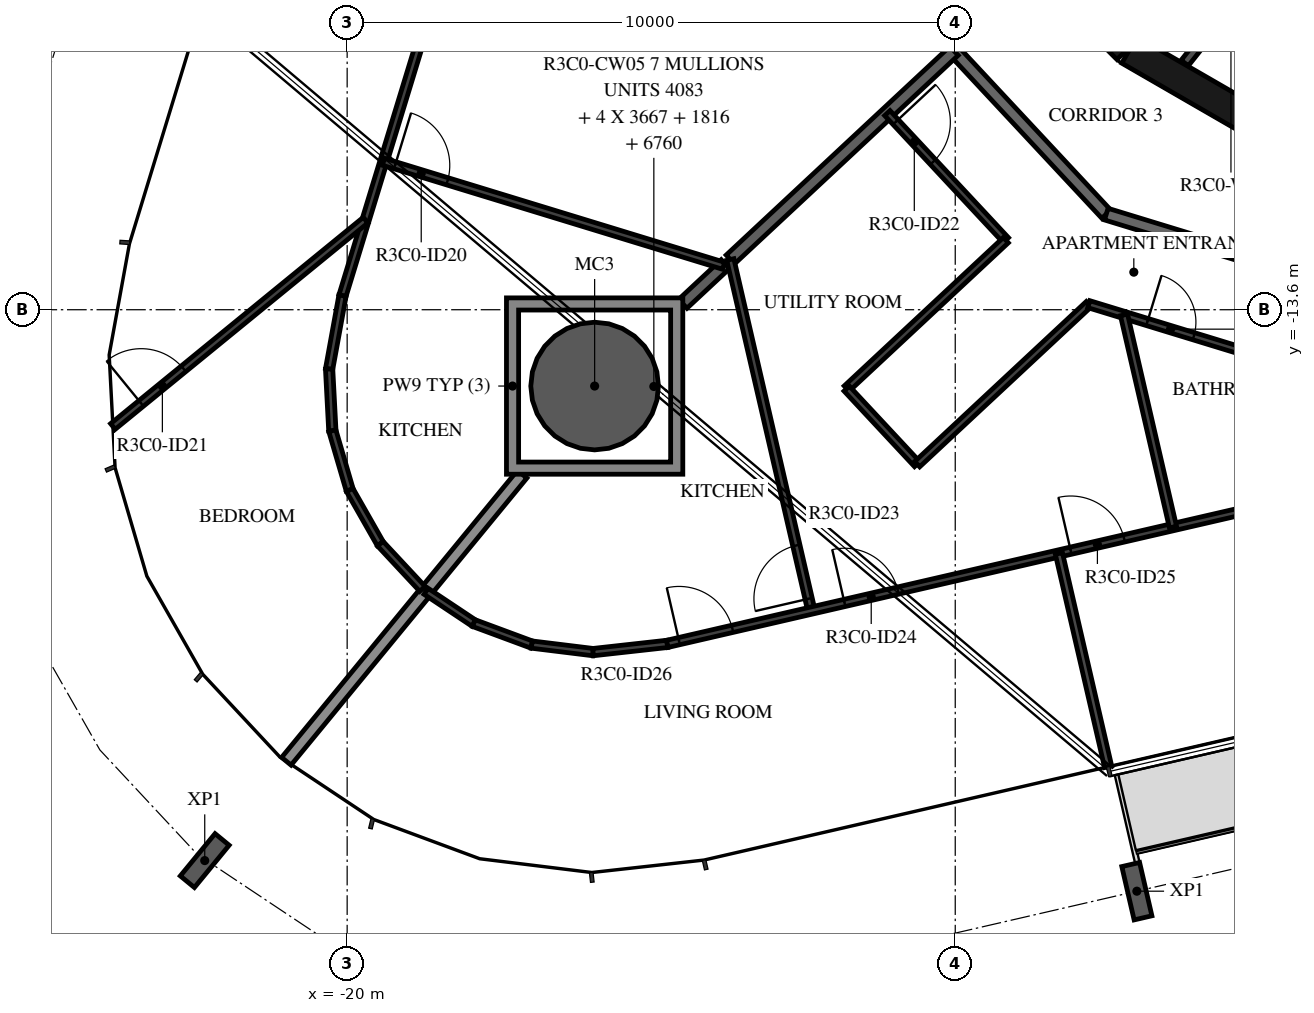
"""IFC4 building model, lengths in metres.
Left out: names, types, materials, properties, quantities, classifications, styles, units other than length and angle.
Written with IfcOpenShell. Run it as: python <this file> out.ifc"""

import sys

from ifc_helpers import new_model, si_unit, direction, frame, frame_2d, origin, origin_2d, place, context, subcontext, project, spatial, polyline, rectangle, hollow_circle, i_section, outline, extrude, element, fill, save


model = new_model("IFC4")
c1 = context("Model", 3, precision=1e-05, world=origin(), true_north=direction((0.0, 1.0)))
c2 = subcontext(c1, "Body", "Model", "MODEL_VIEW")
j1 = project(units=[si_unit("LENGTHUNIT", "METRE"), si_unit("PLANEANGLEUNIT", "RADIAN")], contexts=[c1])
p1 = place(None, origin())
s1 = spatial("IfcSite", under=j1, at=p1, CompositionType="ELEMENT")
p2 = place(p1, origin())
s2 = spatial("IfcBuilding", under=s1, at=p2, CompositionType="ELEMENT")
p3 = place(p2, frame((0.0, 0.0, 134.4)))
s3 = spatial("IfcBuildingStorey", under=s2, at=p3, CompositionType="ELEMENT", Elevation=134.4)
p4 = place(p3, frame((-15.93, -14.855, -0.38), z_axis=(0.0, 0.0, 1.0), x_axis=(1.0, 0.0, 0.0)))
e1 = element("IfcColumn", 1, at=p4, inside=s3, PredefinedType="COLUMN", context=c2, shape_type="SweptSolid", body=[
    extrude(hollow_circle(Radius=1.05, WallThickness=0.05, at=origin_2d()), origin(), (0.0, 0.0, 1.0), 3.5),
])
for number, where, z_axis, x_axis in (
    (2, (-22.342, -22.659, -0.38), (0.0, 0.0, 1.0), (-0.773, 0.635, 0.0)),
    (3, (-7.013, -23.162, -0.38), (0.0, 0.0, 1.0), (-0.974, -0.225, 0.0)),
):
    element("IfcColumn", number, at=place(p3, frame(where, z_axis=z_axis, x_axis=x_axis)), inside=s3, PredefinedType="COLUMN", context=c2, shape_type="SweptSolid", body=[
        extrude(i_section(OverallWidth=0.3, OverallDepth=0.9, WebThickness=0.019, FlangeThickness=0.035, FilletRadius=0.03, at=origin_2d()), origin(), (0.0, 0.0, 1.0), 3.5),
    ])
p5 = place(p3, frame((-9.308, -7.164, 0.0), z_axis=(0.0, 0.0, 1.0), x_axis=(0.707106781187, -0.707106781187, 0.0)))
e4 = element("IfcWall", 4, at=p5, inside=s3, PredefinedType="SHEAR", context=c2, shape_type="SweptSolid", body=[
    extrude(rectangle(XDim=3.032, YDim=0.5, at=frame_2d((1.516, 0.0))), origin(), (0.0, 0.0, 1.0), 3.12),
])
p6 = place(p3, frame((-7.137, -9.329, 0.0), z_axis=(0.0, 0.0, 1.0), x_axis=(0.865975092491, -0.500087131594, 0.0)))
e5 = element("IfcWall", 5, at=p6, inside=s3, PredefinedType="SHEAR", context=c2, shape_type="SweptSolid", body=[
    extrude(rectangle(XDim=3.033, YDim=0.5, at=frame_2d((1.516, 0.0))), origin(), (0.0, 0.0, 1.0), 3.12),
])
p7 = place(p3, frame((-4.706, -7.625, 0.0), z_axis=(0.0, 0.0, 1.0), x_axis=(-0.621392599334, -0.783499353856, 0.0)))
e6 = element("IfcWall", 6, at=p7, inside=s3, PredefinedType="PARTITIONING", context=c2, shape_type="SweptSolid", body=[
    extrude(rectangle(XDim=2.447, YDim=0.15, at=frame_2d((1.224, 0.0))), origin(), (0.0, 0.0, 1.0), 3.12),
])
p8 = place(p7, frame((0.774, 0.0, 0.0)))
e7 = element("IfcOpeningElement", 7, at=p8, cuts=e6, PredefinedType="OPENING", context=c2, shape_type="SweptSolid", body=[
    extrude(rectangle(XDim=0.9, YDim=2.1, at=frame_2d((0.45, 1.05))), frame((0.0, 0.085, 0.0), z_axis=(0.0, -1.0, 0.0), x_axis=(1.0, 0.0, 0.0)), (0.0, 0.0, 1.0), 0.17),
])
p9 = place(p3, frame((-12.523, -6.659, 0.0), z_axis=(0.0, 0.0, 1.0), x_axis=(0.682001841105, -0.731350455479, 0.0)))
e8 = element("IfcWall", 8, at=p9, inside=s3, PredefinedType="STANDARD", context=c2, shape_type="SweptSolid", body=[
    extrude(rectangle(XDim=7.342, YDim=0.2, at=frame_2d((3.671, 0.0))), origin(), (0.0, 0.0, 1.0), 3.12),
])
p10 = place(p3, frame((-7.516, -12.028, 0.0), z_axis=(0.0, 0.0, 1.0), x_axis=(0.956306642771, -0.292365533182, 0.0)))
e9 = element("IfcWall", 9, at=p10, inside=s3, PredefinedType="STANDARD", context=c2, shape_type="SweptSolid", body=[
    extrude(rectangle(XDim=7.342, YDim=0.2, at=frame_2d((3.671, 0.0))), origin(), (0.0, 0.0, 1.0), 3.12),
])
p11 = place(p10, frame((5.745, 0.0, 0.0)))
e10 = element("IfcOpeningElement", 10, at=p11, cuts=e9, PredefinedType="OPENING", context=c2, shape_type="SweptSolid", body=[
    extrude(rectangle(XDim=1.0, YDim=2.1, at=frame_2d((0.5, 1.05))), frame((0.0, 0.11, 0.0), z_axis=(0.0, -1.0, 0.0), x_axis=(1.0, 0.0, 0.0)), (0.0, 0.0, 1.0), 0.22),
])
p12 = place(p3, frame((-13.699, -12.774, 0.0), z_axis=(0.0, 0.0, 1.0), x_axis=(0.731353758457, 0.681998299111, 0.0)))
e11 = element("IfcWall", 11, at=p12, inside=s3, PredefinedType="STANDARD", context=c2, shape_type="SweptSolid", body=[
    extrude(rectangle(XDim=5.031, YDim=0.2, at=frame_2d((2.515, 0.0))), origin(), (0.0, 0.0, 1.0), 3.12),
])
p13 = place(p3, frame((-21.0, -21.025, 0.0), z_axis=(0.0, 0.0, 1.0), x_axis=(0.634846795952, 0.772638043116, 0.0)))
e12 = element("IfcWall", 12, at=p13, inside=s3, PredefinedType="STANDARD", context=c2, shape_type="SweptSolid", body=[
    extrude(rectangle(XDim=6.109, YDim=0.2, at=frame_2d((3.055, 0.0))), origin(), (0.0, 0.0, 1.0), 2.73),
])
p14 = place(p3, frame((-14.48, -13.503, 0.0), z_axis=(0.0, 0.0, 1.0), x_axis=(0.73152991834, 0.681809341806, 0.0)))
e13 = element("IfcWall", 13, at=p14, inside=s3, PredefinedType="STANDARD", context=c2, shape_type="SweptSolid", body=[
    extrude(rectangle(XDim=0.958, YDim=0.2, at=frame_2d((0.479, 0.0))), origin(), (0.0, 0.0, 1.0), 3.12),
])
p15 = place(p3, frame((-16.579, -1.928, 0.0), z_axis=(0.0, 0.0, 1.0), x_axis=(-0.29236733738, -0.956306091183, 0.0)))
e14 = element("IfcWall", 14, at=p15, inside=s3, PredefinedType="PARTITIONING", context=c2, shape_type="SweptSolid", body=[
    extrude(rectangle(XDim=11.963, YDim=0.12, at=frame_2d((5.981, 0.0))), origin(), (0.0, 0.0, 1.0), 3.12),
])
p16 = place(p15, frame((3.271, 0.0, 0.0)))
e15 = element("IfcOpeningElement", 15, at=p16, cuts=e14, PredefinedType="OPENING", context=c2, shape_type="SweptSolid", body=[
    extrude(rectangle(XDim=0.9, YDim=2.1, at=frame_2d((0.45, 1.05))), frame((0.0, 0.07, 0.0), z_axis=(0.0, -1.0, 0.0), x_axis=(1.0, 0.0, 0.0)), (0.0, 0.0, 1.0), 0.14),
])
p17 = place(p3, frame((-19.404, -11.167, 0.0), z_axis=(0.0, 0.0, 1.0), x_axis=(0.956314306829, -0.292340463423, 0.0)))
e16 = element("IfcWall", 16, at=p17, inside=s3, PredefinedType="PARTITIONING", context=c2, shape_type="SweptSolid", body=[
    extrude(rectangle(XDim=5.85, YDim=0.12, at=frame_2d((2.925, 0.0))), origin(), (0.0, 0.0, 1.0), 3.12),
])
p18 = place(p17, frame((0.2, 0.0, 0.0)))
e17 = element("IfcOpeningElement", 17, at=p18, cuts=e16, PredefinedType="OPENING", context=c2, shape_type="SweptSolid", body=[
    extrude(rectangle(XDim=0.9, YDim=2.1, at=frame_2d((0.45, 1.05))), frame((0.0, 0.07, 0.0), z_axis=(0.0, -1.0, 0.0), x_axis=(1.0, 0.0, 0.0)), (0.0, 0.0, 1.0), 0.14),
])
p19 = place(p3, frame((-23.852, -15.52, 0.0), z_axis=(0.0, 0.0, 1.0), x_axis=(0.774546990858, 0.632516370502, 0.0)))
e18 = element("IfcWall", 18, at=p19, inside=s3, PredefinedType="PARTITIONING", context=c2, shape_type="SweptSolid", body=[
    extrude(rectangle(XDim=5.365, YDim=0.12, at=frame_2d((2.682, 0.0))), origin(), (0.0, 0.0, 1.0), 3.12),
])
p20 = place(p19, frame((0.6, 0.0, 0.0)))
e19 = element("IfcOpeningElement", 19, at=p20, cuts=e18, PredefinedType="OPENING", context=c2, shape_type="SweptSolid", body=[
    extrude(rectangle(XDim=0.9, YDim=2.1, at=frame_2d((0.45, 1.05))), frame((0.0, 0.07, 0.0), z_axis=(0.0, -1.0, 0.0), x_axis=(1.0, 0.0, 0.0)), (0.0, 0.0, 1.0), 0.14),
])
p21 = place(p3, frame((-20.077, -13.368, 0.0), z_axis=(0.0, 0.0, 1.0), x_axis=(-0.179288174895, -0.983796600087, 0.0)))
e20 = element("IfcWall", 20, at=p21, inside=s3, PredefinedType="PARTITIONING", context=c2, shape_type="SweptSolid", body=[
    extrude(rectangle(XDim=1.227, YDim=0.12, at=frame_2d((0.613, 0.0))), origin(), (0.0, 0.0, 1.0), 3.12),
])
p22 = place(p3, frame((-20.297, -14.575, 0.0), z_axis=(0.0, 0.0, 1.0), x_axis=(0.052142637988, -0.998639647372, 0.0)))
e21 = element("IfcWall", 21, at=p22, inside=s3, PredefinedType="PARTITIONING", context=c2, shape_type="SweptSolid", body=[
    extrude(rectangle(XDim=1.016, YDim=0.12, at=frame_2d((0.508, 0.0))), origin(), (0.0, 0.0, 1.0), 3.12),
])
for number, where, z_axis, x_axis in (
    (22, (-20.244, -15.59, 0.0), (0.0, 0.0, 1.0), (0.281, -0.96, 0.0)),
    (23, (-19.958, -16.565, 0.0), (0.0, 0.0, 1.0), (0.495, -0.869, 0.0)),
    (24, (-19.455, -17.448, 0.0), (0.0, 0.0, 1.0), (0.682, -0.731, 0.0)),
):
    element("IfcWall", number, at=place(p3, frame(where, z_axis=z_axis, x_axis=x_axis)), inside=s3, PredefinedType="PARTITIONING", context=c2, shape_type="SweptSolid", body=[
        extrude(rectangle(XDim=1.016, YDim=0.12, at=frame_2d((0.508, 0.0))), origin(), (0.0, 0.0, 1.0), 3.12),
    ])
p23 = place(p3, frame((-11.117, -10.366, 0.0), z_axis=(0.0, 0.0, 1.0), x_axis=(0.682029016154, -0.73132511315, 0.0)))
e25 = element("IfcWall", 25, at=p23, inside=s3, PredefinedType="PARTITIONING", context=c2, shape_type="SweptSolid", body=[
    extrude(rectangle(XDim=2.858, YDim=0.12, at=frame_2d((1.429, 0.0))), origin(), (0.0, 0.0, 1.0), 3.12),
])
p24 = place(p23, frame((0.2, 0.0, 0.0)))
e26 = element("IfcOpeningElement", 26, at=p24, cuts=e25, PredefinedType="OPENING", context=c2, shape_type="SweptSolid", body=[
    extrude(rectangle(XDim=0.9, YDim=2.1, at=frame_2d((0.45, 1.05))), frame((0.0, 0.07, 0.0), z_axis=(0.0, -1.0, 0.0), x_axis=(1.0, 0.0, 0.0)), (0.0, 0.0, 1.0), 0.14),
])
p25 = place(p3, frame((-9.168, -12.456, 0.0), z_axis=(0.0, 0.0, 1.0), x_axis=(-0.731372816465, -0.681977861324, 0.0)))
e27 = element("IfcWall", 27, at=p25, inside=s3, PredefinedType="PARTITIONING", context=c2, shape_type="SweptSolid", body=[
    extrude(rectangle(XDim=3.578, YDim=0.12, at=frame_2d((1.789, 0.0))), origin(), (0.0, 0.0, 1.0), 3.12),
])
p26 = place(p3, frame((-11.785, -14.897, 0.0), z_axis=(0.0, 0.0, 1.0), x_axis=(0.681975367709, -0.73137514166, 0.0)))
e28 = element("IfcWall", 28, at=p26, inside=s3, PredefinedType="PARTITIONING", context=c2, shape_type="SweptSolid", body=[
    extrude(rectangle(XDim=1.7, YDim=0.12, at=frame_2d((0.85, 0.0))), origin(), (0.0, 0.0, 1.0), 3.12),
])
p27 = place(p3, frame((-10.625, -16.14, 0.0), z_axis=(0.0, 0.0, 1.0), x_axis=(0.73135399721, 0.68199804308, 0.0)))
e29 = element("IfcWall", 29, at=p27, inside=s3, PredefinedType="PARTITIONING", context=c2, shape_type="SweptSolid", body=[
    extrude(rectangle(XDim=3.858, YDim=0.12, at=frame_2d((1.929, 0.0))), origin(), (0.0, 0.0, 1.0), 3.12),
])
p28 = place(p3, frame((-7.804, -13.509, 0.0), z_axis=(0.0, 0.0, 1.0), x_axis=(0.956309088343, -0.292357533772, 0.0)))
e30 = element("IfcWall", 30, at=p28, inside=s3, PredefinedType="PARTITIONING", context=c2, shape_type="SweptSolid", body=[
    extrude(rectangle(XDim=7.586, YDim=0.12, at=frame_2d((3.793, 0.0))), origin(), (0.0, 0.0, 1.0), 3.12),
])
p29 = place(p28, frame((1.006, 0.0, 0.0)))
e31 = element("IfcOpeningElement", 31, at=p29, cuts=e30, PredefinedType="OPENING", context=c2, shape_type="SweptSolid", body=[
    extrude(rectangle(XDim=0.8, YDim=2.1, at=frame_2d((0.4, 1.05))), frame((0.0, 0.07, 0.0), z_axis=(0.0, -1.0, 0.0), x_axis=(1.0, 0.0, 0.0)), (0.0, 0.0, 1.0), 0.14),
])
p30 = place(p3, frame((-12.366, -18.548, 0.0), z_axis=(0.0, 0.0, 1.0), x_axis=(-0.224958805164, 0.974368275335, 0.0)))
e32 = element("IfcWall", 32, at=p30, inside=s3, PredefinedType="PARTITIONING", context=c2, shape_type="SweptSolid", body=[
    extrude(rectangle(XDim=5.926, YDim=0.12, at=frame_2d((2.963, 0.0))), origin(), (0.0, 0.0, 1.0), 3.12),
])
p31 = place(p30, frame((0.2, 0.0, 0.0)))
e33 = element("IfcOpeningElement", 33, at=p31, cuts=e32, PredefinedType="OPENING", context=c2, shape_type="SweptSolid", body=[
    extrude(rectangle(XDim=0.9, YDim=2.1, at=frame_2d((0.45, 1.05))), frame((0.0, 0.07, 0.0), z_axis=(0.0, -1.0, 0.0), x_axis=(1.0, 0.0, 0.0)), (0.0, 0.0, 1.0), 0.14),
])
p32 = place(p3, frame((-18.703, -18.23, 0.0), z_axis=(0.0, 0.0, 1.0), x_axis=(0.832328473933, -0.554282699965, 0.0)))
e34 = element("IfcWall", 34, at=p32, inside=s3, PredefinedType="PARTITIONING", context=c2, shape_type="SweptSolid", body=[
    extrude(rectangle(XDim=0.945, YDim=0.12, at=frame_2d((0.472, 0.0))), origin(), (0.0, 0.0, 1.0), 3.12),
])
p33 = place(p3, frame((-17.917, -18.754, 0.0), z_axis=(0.0, 0.0, 1.0), x_axis=(0.937684971769, -0.347486537462, 0.0)))
e35 = element("IfcWall", 35, at=p33, inside=s3, PredefinedType="PARTITIONING", context=c2, shape_type="SweptSolid", body=[
    extrude(rectangle(XDim=1.016, YDim=0.12, at=frame_2d((0.508, 0.0))), origin(), (0.0, 0.0, 1.0), 3.12),
])
p34 = place(p3, frame((-16.964, -19.107, 0.0), z_axis=(0.0, 0.0, 1.0), x_axis=(0.992523553766, -0.122053247474, 0.0)))
e36 = element("IfcWall", 36, at=p34, inside=s3, PredefinedType="PARTITIONING", context=c2, shape_type="SweptSolid", body=[
    extrude(rectangle(XDim=1.016, YDim=0.12, at=frame_2d((0.508, 0.0))), origin(), (0.0, 0.0, 1.0), 3.12),
])
p35 = place(p3, frame((-15.956, -19.231, 0.0), z_axis=(0.0, 0.0, 1.0), x_axis=(0.993883734674, 0.110431526075, 0.0)))
e37 = element("IfcWall", 37, at=p35, inside=s3, PredefinedType="PARTITIONING", context=c2, shape_type="SweptSolid", body=[
    extrude(rectangle(XDim=1.227, YDim=0.12, at=frame_2d((0.614, 0.0))), origin(), (0.0, 0.0, 1.0), 3.12),
])
p36 = place(p3, frame((-14.736, -19.095, 0.0), z_axis=(0.0, 0.0, 1.0), x_axis=(0.974368335243, 0.224958545682, 0.0)))
e38 = element("IfcWall", 38, at=p36, inside=s3, PredefinedType="PARTITIONING", context=c2, shape_type="SweptSolid", body=[
    extrude(rectangle(XDim=19.263, YDim=0.12, at=frame_2d((9.632, 0.0))), origin(), (0.0, 0.0, 1.0), 3.12),
])
p37 = place(p36, frame((2.993, 0.0, 0.0)))
e39 = element("IfcOpeningElement", 39, at=p37, cuts=e38, PredefinedType="OPENING", context=c2, shape_type="SweptSolid", body=[
    extrude(rectangle(XDim=0.9, YDim=2.1, at=frame_2d((0.45, 1.05))), frame((0.0, 0.07, 0.0), z_axis=(0.0, -1.0, 0.0), x_axis=(1.0, 0.0, 0.0)), (0.0, 0.0, 1.0), 0.14),
])
p38 = place(p36, frame((6.81, 0.0, 0.0)))
e40 = element("IfcOpeningElement", 40, at=p38, cuts=e38, PredefinedType="OPENING", context=c2, shape_type="SweptSolid", body=[
    extrude(rectangle(XDim=0.9, YDim=2.1, at=frame_2d((0.45, 1.05))), frame((0.0, 0.07, 0.0), z_axis=(0.0, -1.0, 0.0), x_axis=(1.0, 0.0, 0.0)), (0.0, 0.0, 1.0), 0.14),
])
p39 = place(p36, frame((0.2, 0.0, 0.0)))
e41 = element("IfcOpeningElement", 41, at=p39, cuts=e38, PredefinedType="OPENING", context=c2, shape_type="SweptSolid", body=[
    extrude(rectangle(XDim=0.9, YDim=2.1, at=frame_2d((0.45, 1.05))), frame((0.0, 0.07, 0.0), z_axis=(0.0, -1.0, 0.0), x_axis=(1.0, 0.0, 0.0)), (0.0, 0.0, 1.0), 0.14),
])
p40 = place(p36, frame((14.839, 0.0, 0.0)))
e42 = element("IfcOpeningElement", 42, at=p40, cuts=e38, PredefinedType="OPENING", context=c2, shape_type="SweptSolid", body=[
    extrude(rectangle(XDim=0.9, YDim=2.1, at=frame_2d((0.45, 1.05))), frame((0.0, 0.07, 0.0), z_axis=(0.0, -1.0, 0.0), x_axis=(1.0, 0.0, 0.0)), (0.0, 0.0, 1.0), 0.14),
])
p41 = place(p3, frame((-6.419, -17.175, 0.0), z_axis=(0.0, 0.0, 1.0), x_axis=(-0.224979003559, 0.974363611778, 0.0)))
e43 = element("IfcWall", 43, at=p41, inside=s3, PredefinedType="PARTITIONING", context=c2, shape_type="SweptSolid", body=[
    extrude(rectangle(XDim=3.581, YDim=0.12, at=frame_2d((1.791, 0.0))), origin(), (0.0, 0.0, 1.0), 3.12),
])
p42 = place(p3, frame((-7.486, -21.116, 0.0), z_axis=(0.0, 0.0, 1.0), x_axis=(-0.224943703639, 0.9743717618, 0.0)))
e44 = element("IfcWall", 44, at=p42, inside=s3, PredefinedType="PARTITIONING", context=c2, shape_type="SweptSolid", body=[
    extrude(rectangle(XDim=3.6, YDim=0.12, at=frame_2d((1.8, 0.0))), origin(), (0.0, 0.0, 1.0), 2.73),
])
p43 = place(p3, origin())
e45 = element("IfcWall", 45, at=p43, inside=s3, PredefinedType="STANDARD", context=c2, shape_type="SweptSolid", body=[
    extrude(outline(polyline([(-14.48, -13.405), (-14.48, -16.305), (-17.38, -16.305), (-17.38, -13.405), (-14.48, -13.405)]), holes=[polyline([(-17.18, -16.105), (-14.68, -16.105), (-14.68, -13.605), (-17.18, -13.605), (-17.18, -16.105)])]), origin(), (0.0, 0.0, 1.0), 3.12),
])
p44 = place(p18, origin())
e46 = element("IfcDoor", 46, at=p44, inside=s3, OperationType="SINGLE_SWING_RIGHT", PredefinedType="DOOR", context=c2, shape_type="SweptSolid", body=[
    extrude(rectangle(XDim=0.9, YDim=2.1, at=frame_2d((0.45, 1.05))), frame((0.0, 0.025, 0.0), z_axis=(0.0, -1.0, 0.0), x_axis=(1.0, 0.0, 0.0)), (0.0, 0.0, 1.0), 0.05),
])
fill(e17, e46)
p45 = place(p20, origin())
e47 = element("IfcDoor", 47, at=p45, inside=s3, OperationType="SINGLE_SWING_RIGHT", PredefinedType="DOOR", context=c2, shape_type="SweptSolid", body=[
    extrude(rectangle(XDim=0.9, YDim=2.1, at=frame_2d((0.45, 1.05))), frame((0.0, 0.025, 0.0), z_axis=(0.0, -1.0, 0.0), x_axis=(1.0, 0.0, 0.0)), (0.0, 0.0, 1.0), 0.05),
])
fill(e19, e47)
p46 = place(p24, origin())
e48 = element("IfcDoor", 48, at=p46, inside=s3, OperationType="SINGLE_SWING_LEFT", PredefinedType="DOOR", context=c2, shape_type="SweptSolid", body=[
    extrude(rectangle(XDim=0.9, YDim=2.1, at=frame_2d((0.45, 1.05))), frame((0.0, 0.025, 0.0), z_axis=(0.0, -1.0, 0.0), x_axis=(1.0, 0.0, 0.0)), (0.0, 0.0, 1.0), 0.05),
])
fill(e26, e48)
p47 = place(p29, origin())
e49 = element("IfcDoor", 49, at=p47, inside=s3, OperationType="SINGLE_SWING_LEFT", PredefinedType="DOOR", context=c2, shape_type="SweptSolid", body=[
    extrude(rectangle(XDim=0.8, YDim=2.1, at=frame_2d((0.4, 1.05))), frame((0.0, 0.025, 0.0), z_axis=(0.0, -1.0, 0.0), x_axis=(1.0, 0.0, 0.0)), (0.0, 0.0, 1.0), 0.05),
])
fill(e31, e49)
p48 = place(p31, origin())
e50 = element("IfcDoor", 50, at=p48, inside=s3, OperationType="SINGLE_SWING_LEFT", PredefinedType="DOOR", context=c2, shape_type="SweptSolid", body=[
    extrude(rectangle(XDim=0.9, YDim=2.1, at=frame_2d((0.45, 1.05))), frame((0.0, 0.025, 0.0), z_axis=(0.0, -1.0, 0.0), x_axis=(1.0, 0.0, 0.0)), (0.0, 0.0, 1.0), 0.05),
])
fill(e33, e50)
p49 = place(p37, origin())
e51 = element("IfcDoor", 51, at=p49, inside=s3, OperationType="SINGLE_SWING_LEFT", PredefinedType="DOOR", context=c2, shape_type="SweptSolid", body=[
    extrude(rectangle(XDim=0.9, YDim=2.1, at=frame_2d((0.45, 1.05))), frame((0.0, 0.025, 0.0), z_axis=(0.0, -1.0, 0.0), x_axis=(1.0, 0.0, 0.0)), (0.0, 0.0, 1.0), 0.05),
])
fill(e39, e51)
p50 = place(p38, origin())
e52 = element("IfcDoor", 52, at=p50, inside=s3, OperationType="SINGLE_SWING_LEFT", PredefinedType="DOOR", context=c2, shape_type="SweptSolid", body=[
    extrude(rectangle(XDim=0.9, YDim=2.1, at=frame_2d((0.45, 1.05))), frame((0.0, 0.025, 0.0), z_axis=(0.0, -1.0, 0.0), x_axis=(1.0, 0.0, 0.0)), (0.0, 0.0, 1.0), 0.05),
])
fill(e40, e52)
p51 = place(p39, origin())
e53 = element("IfcDoor", 53, at=p51, inside=s3, OperationType="SINGLE_SWING_LEFT", PredefinedType="DOOR", context=c2, shape_type="SweptSolid", body=[
    extrude(rectangle(XDim=0.9, YDim=2.1, at=frame_2d((0.45, 1.05))), frame((0.0, 0.025, 0.0), z_axis=(0.0, -1.0, 0.0), x_axis=(1.0, 0.0, 0.0)), (0.0, 0.0, 1.0), 0.05),
])
fill(e41, e53)
save(model, sys.argv[1])
